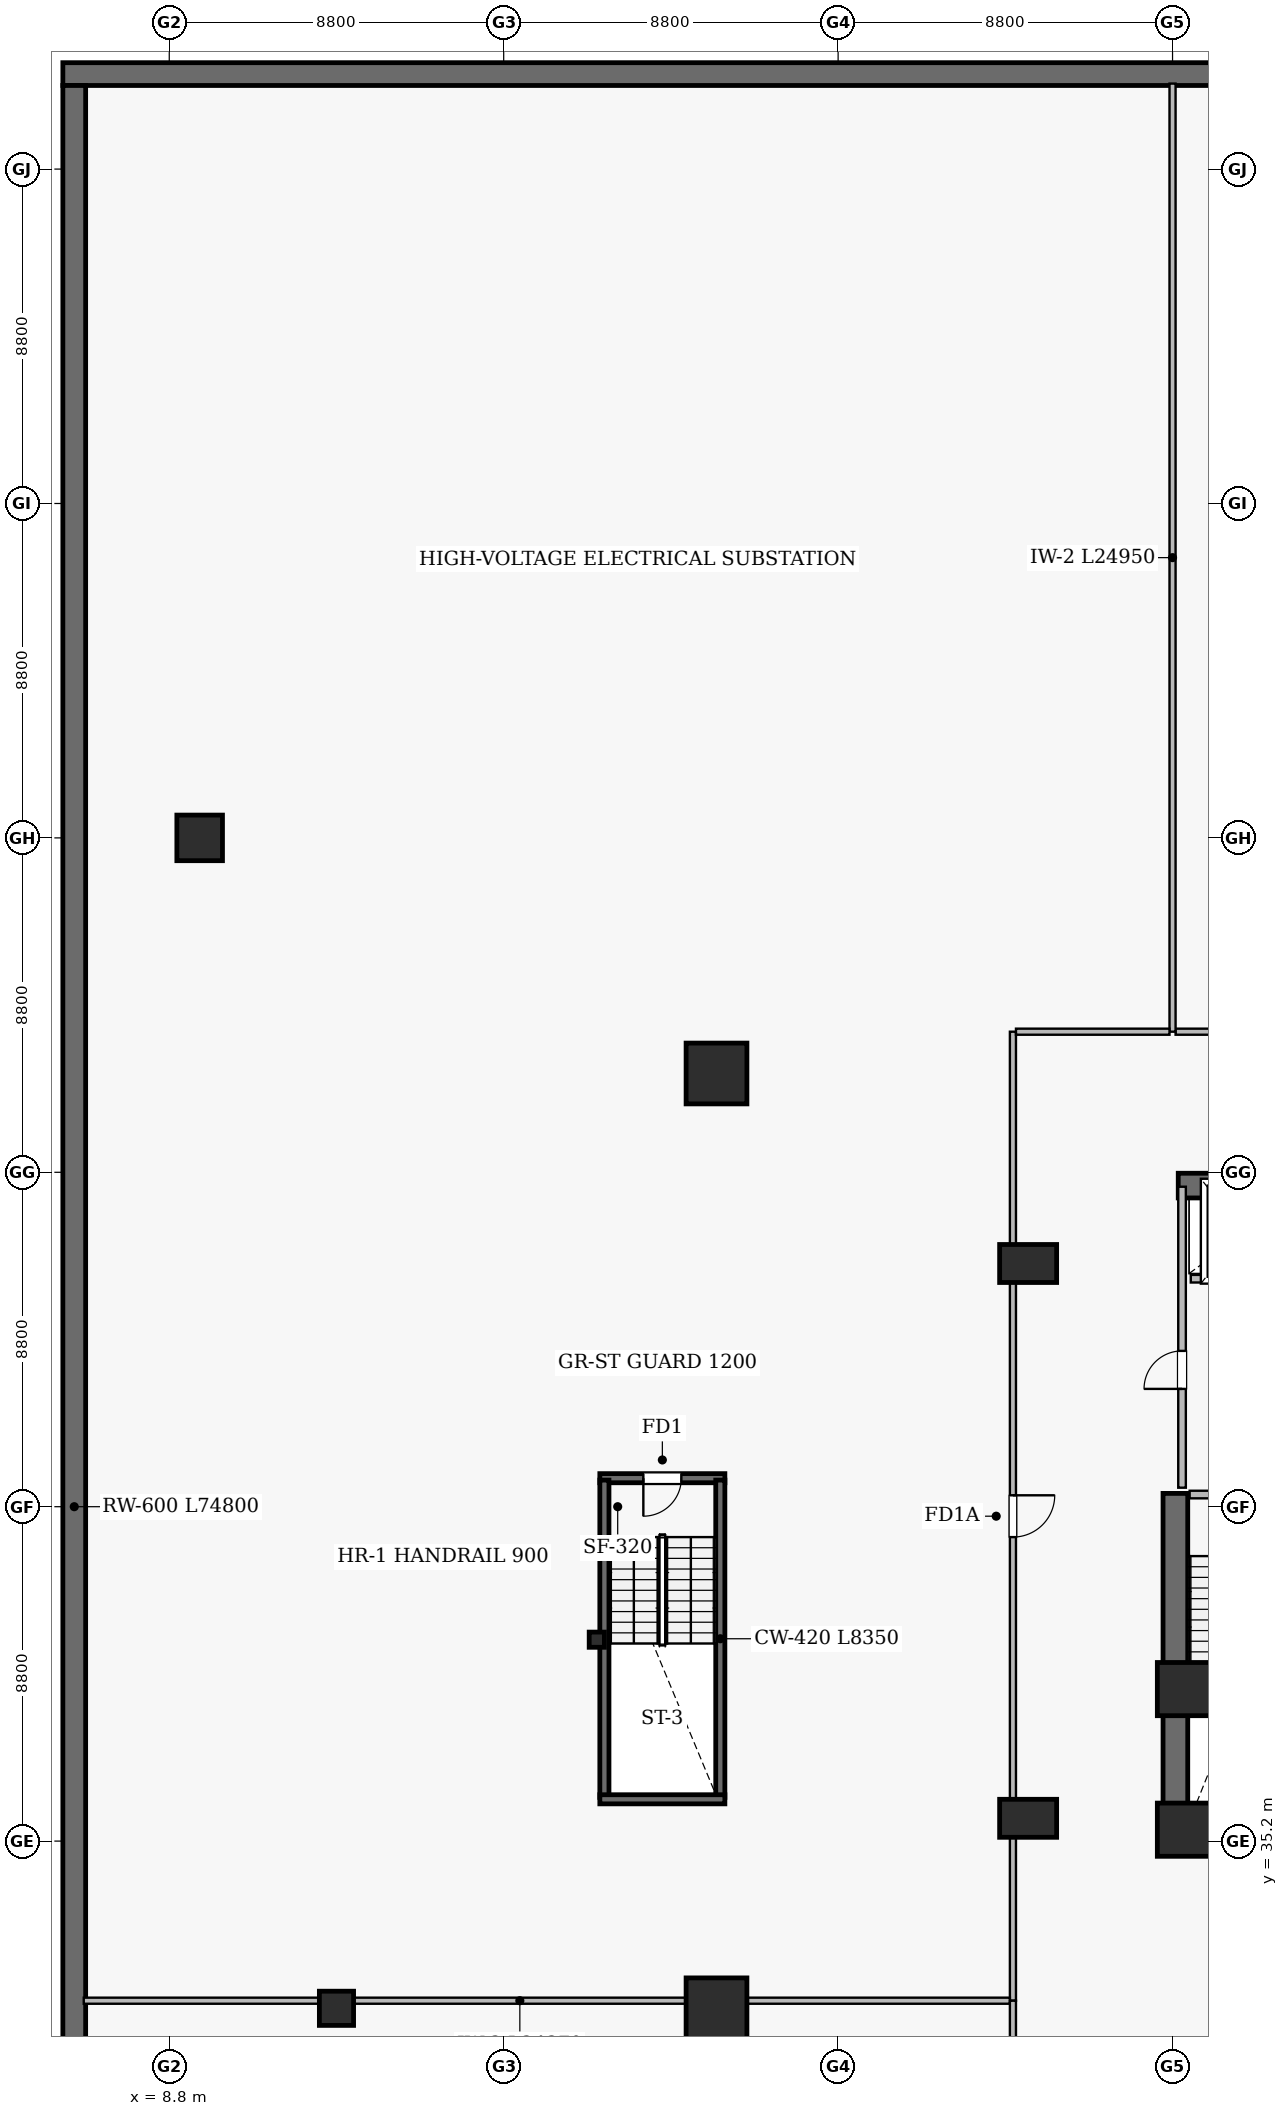
"""IFC4 building model, lengths in metres.
Left out: names, types, materials, properties, quantities, classifications, styles, units other than length and angle.
Written with IfcOpenShell. Run it as: python <this file> out.ifc"""

import sys

from ifc_helpers import new_model, si_unit, direction, frame, frame_2d, origin, origin_2d, place, context, subcontext, project, spatial, rectangle, i_section, extrude, element, fill, save


model = new_model("IFC4")
c1 = context("Model", 3, precision=1e-05, world=origin(), true_north=direction((0.0, 1.0)))
c2 = subcontext(c1, "Body", "Model", "MODEL_VIEW")
j1 = project(units=[si_unit("LENGTHUNIT", "METRE"), si_unit("PLANEANGLEUNIT", "RADIAN")], contexts=[c1])
p1 = place(None, origin())
s1 = spatial("IfcSite", under=j1, at=p1, CompositionType="ELEMENT")
p2 = place(p1, origin())
s2 = spatial("IfcBuilding", under=s1, at=p2, CompositionType="ELEMENT")
p3 = place(p2, frame((0.0, 0.0, -3.9)))
s3 = spatial("IfcBuildingStorey", under=s2, at=p3, CompositionType="ELEMENT", Elevation=-3.9)
p4 = place(p3, frame((82.0, 81.7, 0.0), z_axis=(0.0, 0.0, 1.0), x_axis=(-1.0, 0.0, 0.0)))
e1 = element("IfcWall", 1, at=p4, inside=s3, PredefinedType="SOLIDWALL", context=c2, shape_type="SweptSolid", body=[
    extrude(rectangle(XDim=76.0, YDim=0.6, at=frame_2d((38.0, 0.0))), origin(), (0.0, 0.0, 1.0), 3.6),
])
p5 = place(p3, frame((6.3, 81.4, 0.0), z_axis=(0.0, 0.0, 1.0), x_axis=(0.0, -1.0, 0.0)))
e2 = element("IfcWall", 2, at=p5, inside=s3, PredefinedType="SOLIDWALL", context=c2, shape_type="SweptSolid", body=[
    extrude(rectangle(XDim=74.8, YDim=0.6, at=frame_2d((37.4, 0.0))), origin(), (0.0, 0.0, 1.0), 3.6),
])
p6 = place(p3, frame((35.35, 52.45, 0.0), z_axis=(0.0, 0.0, 1.0), x_axis=(1.0, 0.0, 0.0)))
e3 = element("IfcWall", 3, at=p6, inside=s3, PredefinedType="SHEAR", context=c2, shape_type="SweptSolid", body=[
    extrude(rectangle(XDim=17.3, YDim=0.65, at=frame_2d((8.65, 0.0))), origin(), (0.0, 0.0, 1.0), 3.6),
])
p7 = place(p3, frame((34.95, 35.275, 0.0), z_axis=(0.0, 0.0, 1.0), x_axis=(1.0, 0.0, 0.0)))
e4 = element("IfcWall", 4, at=p7, inside=s3, PredefinedType="SHEAR", context=c2, shape_type="SweptSolid", body=[
    extrude(rectangle(XDim=4.15, YDim=0.65, at=frame_2d((2.075, 0.0))), origin(), (0.0, 0.0, 1.0), 3.6),
])
p8 = place(p3, frame((35.275, 34.95, 0.0), z_axis=(0.0, 0.0, 1.0), x_axis=(0.0, 1.0, 0.0)))
e5 = element("IfcWall", 5, at=p8, inside=s3, PredefinedType="SHEAR", context=c2, shape_type="SweptSolid", body=[
    extrude(rectangle(XDim=9.4, YDim=0.65, at=frame_2d((4.7, 0.0))), origin(), (0.0, 0.0, 1.0), 3.6),
])
for number, where, z_axis, x_axis in (
    (6, (35.5, 35.5, 0.0), (0.0, 0.0, 1.0), (1.0, 0.0, 0.0)),
    (7, (35.5, 39.2, 0.0), (0.0, 0.0, 1.0), (1.0, 0.0, 0.0)),
):
    element("IfcColumn", number, at=place(p3, frame(where, z_axis=z_axis, x_axis=x_axis)), inside=s3, PredefinedType="COLUMN", context=c2, shape_type="SweptSolid", body=[
        extrude(rectangle(XDim=1.4, YDim=1.4, at=origin_2d()), origin(), (0.0, 0.0, 1.0), 3.9),
    ])
for number, where, z_axis, x_axis in (
    (8, (31.4, 35.8, 0.0), (0.0, 0.0, 1.0), (1.0, 0.0, 0.0)),
    (9, (31.4, 50.4, 0.0), (0.0, 0.0, 1.0), (1.0, 0.0, 0.0)),
):
    element("IfcColumn", number, at=place(p3, frame(where, z_axis=z_axis, x_axis=x_axis)), inside=s3, PredefinedType="COLUMN", context=c2, shape_type="SweptSolid", body=[
        extrude(rectangle(XDim=1.5, YDim=1.0, at=origin_2d()), origin(), (0.0, 0.0, 1.0), 3.9),
    ])
for number, where, z_axis, x_axis in (
    (10, (23.2, 30.8, 0.0), (0.0, 0.0, 1.0), (1.0, 0.0, 0.0)),
    (11, (23.2, 55.4, 0.0), (0.0, 0.0, 1.0), (1.0, 0.0, 0.0)),
):
    element("IfcColumn", number, at=place(p3, frame(where, z_axis=z_axis, x_axis=x_axis)), inside=s3, PredefinedType="COLUMN", context=c2, shape_type="SweptSolid", body=[
        extrude(rectangle(XDim=1.6, YDim=1.6, at=origin_2d()), origin(), (0.0, 0.0, 1.0), 3.9),
    ])
p9 = place(p3, frame((13.2, 30.8, 0.0), z_axis=(0.0, 0.0, 1.0), x_axis=(1.0, 0.0, 0.0)))
e12 = element("IfcColumn", 12, at=p9, inside=s3, PredefinedType="COLUMN", context=c2, shape_type="SweptSolid", body=[
    extrude(rectangle(XDim=0.9, YDim=0.9, at=origin_2d()), origin(), (0.0, 0.0, 1.0), 3.9),
])
p10 = place(p3, frame((20.05, 40.5, 0.0), z_axis=(0.0, 0.0, 1.0), x_axis=(1.0, 0.0, 0.0)))
e13 = element("IfcColumn", 13, at=p10, inside=s3, PredefinedType="PILASTER", context=c2, shape_type="SweptSolid", body=[
    extrude(i_section(OverallWidth=0.4, OverallDepth=0.4, WebThickness=0.013, FlangeThickness=0.021, FilletRadius=0.022, at=origin_2d()), origin(), (0.0, 0.0, 1.0), 3.9),
])
p11 = place(p3, frame((9.6, 61.6, 0.0), z_axis=(0.0, 0.0, 1.0), x_axis=(1.0, 0.0, 0.0)))
e14 = element("IfcColumn", 14, at=p11, inside=s3, PredefinedType="COLUMN", context=c2, shape_type="SweptSolid", body=[
    extrude(rectangle(XDim=1.2, YDim=1.2, at=origin_2d()), origin(), (0.0, 0.0, 1.0), 3.9),
])
p12 = place(p3, frame((20.13, 44.75, 0.0), z_axis=(0.0, 0.0, 1.0), x_axis=(1.0, 0.0, 0.0)))
e15 = element("IfcWall", 15, at=p12, inside=s3, PredefinedType="SHEAR", context=c2, shape_type="SweptSolid", body=[
    extrude(rectangle(XDim=3.29, YDim=0.24, at=frame_2d((1.645, 0.0))), origin(), (0.0, 0.0, 1.0), 3.6),
])
p13 = place(p12, frame((1.145, 0.0, 0.0)))
e16 = element("IfcOpeningElement", 16, at=p13, cuts=e15, PredefinedType="OPENING", context=c2, shape_type="SweptSolid", body=[
    extrude(rectangle(XDim=1.0, YDim=2.15, at=frame_2d((0.5, 1.075))), frame((0.0, 0.13, 0.0), z_axis=(0.0, -1.0, 0.0), x_axis=(1.0, 0.0, 0.0)), (0.0, 0.0, 1.0), 0.26),
])
for number, where, z_axis, x_axis in (
    (17, (20.25, 36.35, 0.0), (0.0, 0.0, 1.0), (0.0, 1.0, 0.0)),
    (18, (23.3, 36.35, 0.0), (0.0, 0.0, 1.0), (0.0, 1.0, 0.0)),
):
    element("IfcWall", number, at=place(p3, frame(where, z_axis=z_axis, x_axis=x_axis)), inside=s3, PredefinedType="SHEAR", context=c2, shape_type="SweptSolid", body=[
        extrude(rectangle(XDim=8.35, YDim=0.24, at=frame_2d((4.175, 0.0))), origin(), (0.0, 0.0, 1.0), 3.6),
    ])
p14 = place(p3, frame((20.13, 36.3, 0.0), z_axis=(0.0, 0.0, 1.0), x_axis=(1.0, 0.0, 0.0)))
e19 = element("IfcWall", 19, at=p14, inside=s3, PredefinedType="SHEAR", context=c2, shape_type="SweptSolid", body=[
    extrude(rectangle(XDim=3.29, YDim=0.24, at=frame_2d((1.645, 0.0))), origin(), (0.0, 0.0, 1.0), 3.6),
])
p15 = place(p3, frame((31.0, 56.5, 0.0), z_axis=(0.0, 0.0, 1.0), x_axis=(0.0, -1.0, 0.0)))
e20 = element("IfcWall", 20, at=p15, inside=s3, PredefinedType="SOLIDWALL", context=c2, shape_type="SweptSolid", body=[
    extrude(rectangle(XDim=25.5, YDim=0.16, at=frame_2d((12.75, 0.0))), origin(), (0.0, 0.0, 1.0), 2.788),
])
p16 = place(p15, frame((12.2, 0.0, 0.0)))
e21 = element("IfcOpeningElement", 21, at=p16, cuts=e20, PredefinedType="OPENING", context=c2, shape_type="SweptSolid", body=[
    extrude(rectangle(XDim=1.1, YDim=2.15, at=frame_2d((0.55, 1.075))), frame((0.0, 0.09, 0.0), z_axis=(0.0, -1.0, 0.0), x_axis=(1.0, 0.0, 0.0)), (0.0, 0.0, 1.0), 0.18),
])
p17 = place(p3, frame((56.42, 56.5, 0.0), z_axis=(0.0, 0.0, 1.0), x_axis=(-1.0, 0.0, 0.0)))
e22 = element("IfcWall", 22, at=p17, inside=s3, PredefinedType="SOLIDWALL", context=c2, shape_type="SweptSolid", body=[
    extrude(rectangle(XDim=21.14, YDim=0.16, at=frame_2d((10.57, 0.0))), origin(), (0.0, 0.0, 1.0), 2.938),
])
p18 = place(p17, frame((9.84, 0.0, 0.0)))
e23 = element("IfcOpeningElement", 23, at=p18, cuts=e22, PredefinedType="OPENING", context=c2, shape_type="SweptSolid", body=[
    extrude(rectangle(XDim=1.1, YDim=2.15, at=frame_2d((0.55, 1.075))), frame((0.0, 0.09, 0.0), z_axis=(0.0, -1.0, 0.0), x_axis=(1.0, 0.0, 0.0)), (0.0, 0.0, 1.0), 0.18),
])
p19 = place(p3, frame((35.45, 44.5, 0.0), z_axis=(0.0, 0.0, 1.0), x_axis=(0.0, 1.0, 0.0)))
e24 = element("IfcWall", 24, at=p19, inside=s3, PredefinedType="SOLIDWALL", context=c2, shape_type="SweptSolid", body=[
    extrude(rectangle(XDim=7.92, YDim=0.2, at=frame_2d((3.96, 0.0))), origin(), (0.0, 0.0, 1.0), 3.6),
])
p20 = place(p19, frame((2.6, 0.0, 0.0)))
e25 = element("IfcOpeningElement", 25, at=p20, cuts=e24, PredefinedType="OPENING", context=c2, shape_type="SweptSolid", body=[
    extrude(rectangle(XDim=1.0, YDim=2.15, at=frame_2d((0.5, 1.075))), frame((0.0, 0.11, 0.0), z_axis=(0.0, -1.0, 0.0), x_axis=(1.0, 0.0, 0.0)), (0.0, 0.0, 1.0), 0.22),
])
p21 = place(p3, frame((35.65, 44.32, 0.0), z_axis=(0.0, 0.0, 1.0), x_axis=(1.0, 0.0, 0.0)))
e26 = element("IfcWall", 26, at=p21, inside=s3, PredefinedType="SOLIDWALL", context=c2, shape_type="SweptSolid", body=[
    extrude(rectangle(XDim=2.8, YDim=0.2, at=frame_2d((1.4, 0.0))), origin(), (0.0, 0.0, 1.0), 3.6),
])
p22 = place(p21, frame((0.9, 0.0, 0.0)))
e27 = element("IfcOpeningElement", 27, at=p22, cuts=e26, PredefinedType="OPENING", context=c2, shape_type="SweptSolid", body=[
    extrude(rectangle(XDim=1.0, YDim=2.15, at=frame_2d((0.5, 1.075))), frame((0.0, 0.11, 0.0), z_axis=(0.0, -1.0, 0.0), x_axis=(1.0, 0.0, 0.0)), (0.0, 0.0, 1.0), 0.22),
])
p23 = place(p3, frame((35.68, 50.0, 0.0), z_axis=(0.0, 0.0, 1.0), x_axis=(1.0, 0.0, 0.0)))
e28 = element("IfcWall", 28, at=p23, inside=s3, PredefinedType="SOLIDWALL", context=c2, shape_type="SweptSolid", body=[
    extrude(rectangle(XDim=2.8, YDim=0.2, at=frame_2d((1.4, 0.0))), origin(), (0.0, 0.0, 1.0), 3.6),
])
p24 = place(p23, frame((0.85, 0.0, 0.0)))
e29 = element("IfcOpeningElement", 29, at=p24, cuts=e28, PredefinedType="OPENING", context=c2, shape_type="SweptSolid", body=[
    extrude(rectangle(XDim=1.1, YDim=2.15, at=frame_2d((0.55, 1.075))), frame((0.0, 0.11, 0.0), z_axis=(0.0, -1.0, 0.0), x_axis=(1.0, 0.0, 0.0)), (0.0, 0.0, 1.0), 0.22),
])
p25 = place(p3, frame((35.2, 56.5, 0.0), z_axis=(0.0, 0.0, 1.0), x_axis=(0.0, 1.0, 0.0)))
e30 = element("IfcWall", 30, at=p25, inside=s3, PredefinedType="SOLIDWALL", context=c2, shape_type="SweptSolid", body=[
    extrude(rectangle(XDim=24.95, YDim=0.16, at=frame_2d((12.475, 0.0))), origin(), (0.0, 0.0, 1.0), 2.888),
])
p26 = place(p3, frame((30.92, 31.0, 0.0), z_axis=(0.0, 0.0, 1.0), x_axis=(-1.0, 0.0, 0.0)))
e31 = element("IfcWall", 31, at=p26, inside=s3, PredefinedType="SOLIDWALL", context=c2, shape_type="SweptSolid", body=[
    extrude(rectangle(XDim=24.37, YDim=0.16, at=frame_2d((12.185, 0.0))), origin(), (0.0, 0.0, 1.0), 2.788),
])
p27 = place(p3, frame((31.0, 31.0, 0.0), z_axis=(0.0, 0.0, 1.0), x_axis=(0.0, -1.0, 0.0)))
e32 = element("IfcWall", 32, at=p27, inside=s3, PredefinedType="SOLIDWALL", context=c2, shape_type="SweptSolid", body=[
    extrude(rectangle(XDim=9.0, YDim=0.16, at=frame_2d((4.5, 0.0))), origin(), (0.0, 0.0, 1.0), 2.888),
])
p28 = place(p3, frame((35.12, 56.5, 0.0), z_axis=(0.0, 0.0, 1.0), x_axis=(-1.0, 0.0, 0.0)))
e33 = element("IfcWall", 33, at=p28, inside=s3, PredefinedType="SOLIDWALL", context=c2, shape_type="SweptSolid", body=[
    extrude(rectangle(XDim=4.04, YDim=0.16, at=frame_2d((2.02, 0.0))), origin(), (0.0, 0.0, 1.0), 3.6),
])
p29 = place(p13, frame((1.0, 0.0, 0.0), z_axis=(0.0, 0.0, 1.0), x_axis=(-1.0, 0.0, 0.0)))
e34 = element("IfcDoor", 34, at=p29, inside=s3, OperationType="SINGLE_SWING_LEFT", PredefinedType="DOOR", context=c2, shape_type="SweptSolid", body=[
    extrude(rectangle(XDim=1.0, YDim=2.15, at=frame_2d((0.5, 1.075))), frame((0.0, 0.025, 0.0), z_axis=(0.0, -1.0, 0.0), x_axis=(1.0, 0.0, 0.0)), (0.0, 0.0, 1.0), 0.05),
])
fill(e16, e34)
p30 = place(p20, origin())
e35 = element("IfcDoor", 35, at=p30, inside=s3, OperationType="SINGLE_SWING_LEFT", PredefinedType="DOOR", context=c2, shape_type="SweptSolid", body=[
    extrude(rectangle(XDim=1.0, YDim=2.15, at=frame_2d((0.5, 1.075))), frame((0.0, 0.025, 0.0), z_axis=(0.0, -1.0, 0.0), x_axis=(1.0, 0.0, 0.0)), (0.0, 0.0, 1.0), 0.05),
])
fill(e25, e35)
p31 = place(p16, origin())
e36 = element("IfcDoor", 36, at=p31, inside=s3, OperationType="SINGLE_SWING_LEFT", PredefinedType="DOOR", context=c2, shape_type="SweptSolid", body=[
    extrude(rectangle(XDim=1.1, YDim=2.15, at=frame_2d((0.55, 1.075))), frame((0.0, 0.025, 0.0), z_axis=(0.0, -1.0, 0.0), x_axis=(1.0, 0.0, 0.0)), (0.0, 0.0, 1.0), 0.05),
])
fill(e21, e36)
save(model, sys.argv[1])
